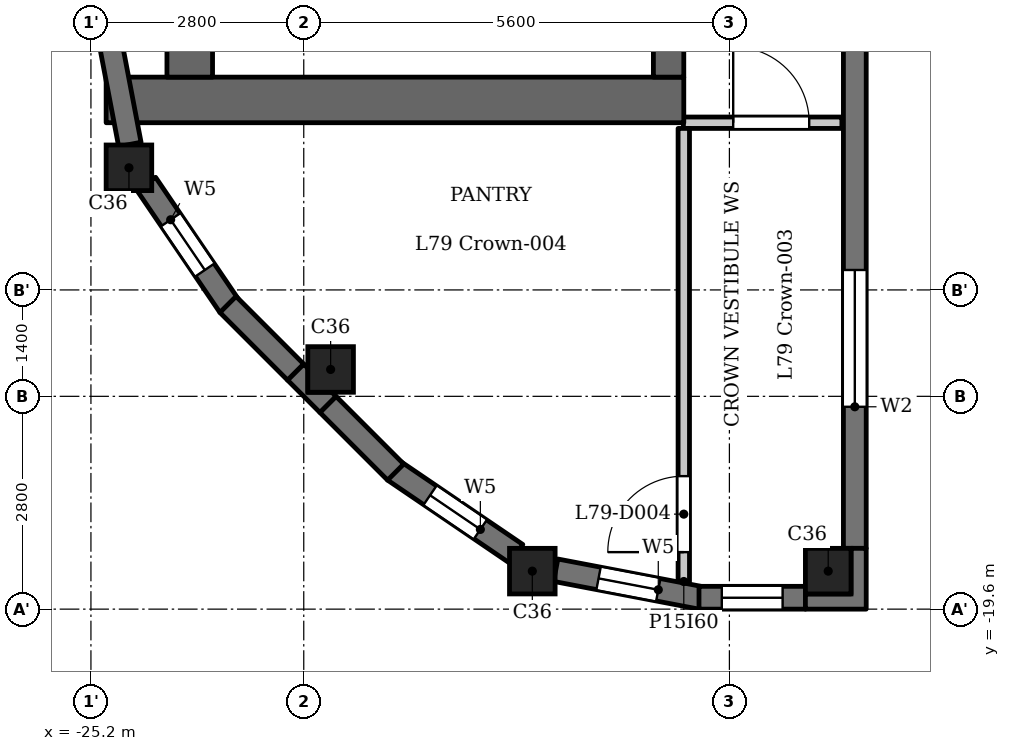
"""IFC4 building model, lengths in metres.
Left out: names, types, materials, properties, quantities, classifications, styles, units other than length and angle.
Written with IfcOpenShell. Run it as: python <this file> out.ifc"""

import sys

from ifc_helpers import new_model, si_unit, direction, frame, frame_2d, origin, origin_2d, place, context, subcontext, project, spatial, polyline, rectangle, outline, extrude, element, fill, save


model = new_model("IFC4")
c1 = context("Model", 3, precision=1e-05, world=origin(), true_north=direction((0.0, 1.0)))
c2 = subcontext(c1, "Body", "Model", "MODEL_VIEW")
j1 = project(units=[si_unit("LENGTHUNIT", "METRE"), si_unit("PLANEANGLEUNIT", "RADIAN")], contexts=[c1])
p1 = place(None, origin())
s1 = spatial("IfcSite", under=j1, at=p1, CompositionType="ELEMENT")
p2 = place(p1, origin())
s2 = spatial("IfcBuilding", under=s1, at=p2, CompositionType="ELEMENT")
p3 = place(p2, frame((0.0, 0.0, 306.9)))
s3 = spatial("IfcBuildingStorey", under=s2, at=p3, CompositionType="ELEMENT", Elevation=306.9)
for number, where, z_axis, x_axis in (
    (1, (-24.7, -13.793, 0.0), (0.0, 0.0, 1.0), (1.0, 0.0, 0.0)),
    (2, (-22.046, -16.446, 0.0), (0.0, 0.0, 1.0), (1.0, 0.0, 0.0)),
    (3, (-19.393, -19.1, 0.0), (0.0, 0.0, 1.0), (1.0, 0.0, 0.0)),
    (4, (-15.5, -19.1, 0.0), (0.0, 0.0, 1.0), (1.0, 0.0, 0.0)),
):
    element("IfcColumn", number, at=place(p3, frame(where, z_axis=z_axis, x_axis=x_axis)), inside=s3, PredefinedType="COLUMN", context=c2, shape_type="SweptSolid", body=[
        extrude(rectangle(XDim=0.6, YDim=0.6, at=origin_2d()), origin(), (0.0, 0.0, 1.0), 3.5),
    ])
p4 = place(p3, frame((-21.213, -17.779, 0.0), z_axis=(0.0, 0.0, 1.0), x_axis=(0.827022075481, -0.562169446579, 0.0)))
e5 = element("IfcWall", 5, at=p4, inside=s3, PredefinedType="SOLIDWALL", context=c2, shape_type="SweptSolid", body=[
    extrude(rectangle(XDim=1.948, YDim=0.3, at=frame_2d((0.974, 0.0))), origin(), (0.0, 0.0, 1.0), 2.6),
])
p5 = place(p4, frame((0.574, 0.0, 0.6)))
e6 = element("IfcOpeningElement", 6, at=p5, cuts=e5, PredefinedType="OPENING", context=c2, shape_type="SweptSolid", body=[
    extrude(rectangle(XDim=0.8, YDim=1.55, at=frame_2d((0.4, 0.775))), frame((0.0, 0.16, 0.0), z_axis=(0.0, -1.0, 0.0), x_axis=(1.0, 0.0, 0.0)), (0.0, 0.0, 1.0), 0.32),
])
p6 = place(p3, frame((-19.085, -19.088, 0.0), z_axis=(0.0, 0.0, 1.0), x_axis=(0.982286967073, -0.187382801553, 0.0)))
e7 = element("IfcWall", 7, at=p6, inside=s3, PredefinedType="SOLIDWALL", context=c2, shape_type="SweptSolid", body=[
    extrude(rectangle(XDim=1.948, YDim=0.3, at=frame_2d((0.974, 0.0))), origin(), (0.0, 0.0, 1.0), 2.6),
])
p7 = place(p6, frame((0.574, 0.0, 0.6)))
e8 = element("IfcOpeningElement", 8, at=p7, cuts=e7, PredefinedType="OPENING", context=c2, shape_type="SweptSolid", body=[
    extrude(rectangle(XDim=0.8, YDim=1.55, at=frame_2d((0.4, 0.775))), frame((0.0, 0.16, 0.0), z_axis=(0.0, -1.0, 0.0), x_axis=(1.0, 0.0, 0.0)), (0.0, 0.0, 1.0), 0.32),
])
p8 = place(p3, frame((-17.2, -19.45, 0.0), z_axis=(0.0, 0.0, 1.0), x_axis=(1.0, 0.0, 0.0)))
e9 = element("IfcWall", 9, at=p8, inside=s3, PredefinedType="SOLIDWALL", context=c2, shape_type="SweptSolid", body=[
    extrude(rectangle(XDim=1.4, YDim=0.3, at=frame_2d((0.7, 0.0))), origin(), (0.0, 0.0, 1.0), 3.2),
])
p9 = place(p8, frame((0.3, 0.0, 0.6)))
e10 = element("IfcOpeningElement", 10, at=p9, cuts=e9, PredefinedType="OPENING", context=c2, shape_type="SweptSolid", body=[
    extrude(rectangle(XDim=0.8, YDim=1.55, at=frame_2d((0.4, 0.775))), frame((0.0, 0.16, 0.0), z_axis=(0.0, -1.0, 0.0), x_axis=(1.0, 0.0, 0.0)), (0.0, 0.0, 1.0), 0.32),
])
p10 = place(p3, frame((-15.15, -18.8, 0.0), z_axis=(0.0, 0.0, 1.0), x_axis=(0.0, 1.0, 0.0)))
e11 = element("IfcWall", 11, at=p10, inside=s3, PredefinedType="SOLIDWALL", context=c2, shape_type="SweptSolid", body=[
    extrude(rectangle(XDim=7.3, YDim=0.3, at=frame_2d((3.65, 0.0))), origin(), (0.0, 0.0, 1.0), 3.2),
])
p11 = place(p10, frame((1.863, 0.0, 0.9)))
e12 = element("IfcOpeningElement", 12, at=p11, cuts=e11, PredefinedType="OPENING", context=c2, shape_type="SweptSolid", body=[
    extrude(rectangle(XDim=1.8, YDim=1.25, at=frame_2d((0.9, 0.625))), frame((0.0, 0.16, 0.0), z_axis=(0.0, -1.0, 0.0), x_axis=(1.0, 0.0, 0.0)), (0.0, 0.0, 1.0), 0.32),
])
p12 = place(p3, frame((-25.052, -11.573, 0.0), z_axis=(0.0, 0.0, 1.0), x_axis=(0.187354129902, -0.982292436095, 0.0)))
e13 = element("IfcWall", 13, at=p12, inside=s3, PredefinedType="SOLIDWALL", context=c2, shape_type="SweptSolid", body=[
    extrude(rectangle(XDim=1.947, YDim=0.3, at=frame_2d((0.973, 0.0))), origin(), (0.0, 0.0, 1.0), 2.6),
])
p13 = place(p3, frame((-24.474, -14.002, 0.0), z_axis=(0.0, 0.0, 1.0), x_axis=(0.562025435703, -0.827119948752, 0.0)))
e14 = element("IfcWall", 14, at=p13, inside=s3, PredefinedType="SOLIDWALL", context=c2, shape_type="SweptSolid", body=[
    extrude(rectangle(XDim=1.948, YDim=0.3, at=frame_2d((0.974, 0.0))), origin(), (0.0, 0.0, 1.0), 2.6),
])
p14 = place(p13, frame((0.574, 0.0, 0.6)))
e15 = element("IfcOpeningElement", 15, at=p14, cuts=e14, PredefinedType="OPENING", context=c2, shape_type="SweptSolid", body=[
    extrude(rectangle(XDim=0.8, YDim=1.55, at=frame_2d((0.4, 0.775))), frame((0.0, 0.16, 0.0), z_axis=(0.0, -1.0, 0.0), x_axis=(1.0, 0.0, 0.0)), (0.0, 0.0, 1.0), 0.32),
])
for number, where, z_axis, x_axis in (
    (16, (-23.397, -15.591, 0.0), (0.0, 0.0, 1.0), (0.707, -0.707, 0.0)),
    (17, (-22.082, -16.906, 0.0), (0.0, 0.0, 1.0), (0.707, -0.707, 0.0)),
):
    element("IfcWall", number, at=place(p3, frame(where, z_axis=z_axis, x_axis=x_axis)), inside=s3, PredefinedType="SOLIDWALL", context=c2, shape_type="SweptSolid", body=[
        extrude(rectangle(XDim=1.26, YDim=0.3, at=frame_2d((0.63, 0.0))), origin(), (0.0, 0.0, 1.0), 3.2),
    ])
p15 = place(p3, frame((-17.4, -12.9, 0.0), z_axis=(0.0, 0.0, 1.0), x_axis=(-1.0, 0.0, 0.0)))
e18 = element("IfcWall", 18, at=p15, inside=s3, PredefinedType="SHEAR", context=c2, shape_type="SweptSolid", body=[
    extrude(rectangle(XDim=7.6, YDim=0.6, at=frame_2d((3.8, 0.0))), origin(), (0.0, 0.0, 1.0), 3.2),
])
p16 = place(p3, frame((-17.6, -12.6, 0.0), z_axis=(0.0, 0.0, 1.0), x_axis=(0.0, 1.0, 0.0)))
e19 = element("IfcWall", 19, at=p16, inside=s3, PredefinedType="SHEAR", context=c2, shape_type="SweptSolid", body=[
    extrude(rectangle(XDim=25.2, YDim=0.4, at=frame_2d((12.6, 0.0))), origin(), (0.0, 0.0, 1.0), 3.2),
])
p17 = place(p16, frame((8.8, 0.0, 0.0)))
e20 = element("IfcOpeningElement", 20, at=p17, cuts=e19, PredefinedType="OPENING", context=c2, shape_type="SweptSolid", body=[
    extrude(rectangle(XDim=0.9, YDim=2.1, at=frame_2d((0.45, 1.05))), frame((0.0, 0.21, 0.0), z_axis=(0.0, -1.0, 0.0), x_axis=(1.0, 0.0, 0.0)), (0.0, 0.0, 1.0), 0.42),
])
p18 = place(p16, frame((17.05, 0.0, 0.0)))
e21 = element("IfcOpeningElement", 21, at=p18, cuts=e19, PredefinedType="OPENING", context=c2, shape_type="SweptSolid", body=[
    extrude(rectangle(XDim=0.9, YDim=2.1, at=frame_2d((0.45, 1.05))), frame((0.0, 0.21, 0.0), z_axis=(0.0, -1.0, 0.0), x_axis=(1.0, 0.0, 0.0)), (0.0, 0.0, 1.0), 0.42),
])
p19 = place(p16, frame((23.25, 0.0, 0.0)))
e22 = element("IfcOpeningElement", 22, at=p19, cuts=e19, PredefinedType="OPENING", context=c2, shape_type="SweptSolid", body=[
    extrude(rectangle(XDim=1.1, YDim=2.1, at=frame_2d((0.55, 1.05))), frame((0.0, 0.21, 0.0), z_axis=(0.0, -1.0, 0.0), x_axis=(1.0, 0.0, 0.0)), (0.0, 0.0, 1.0), 0.42),
])
p20 = place(p16, frame((0.85, 0.0, 0.0)))
e23 = element("IfcOpeningElement", 23, at=p20, cuts=e19, PredefinedType="OPENING", context=c2, shape_type="SweptSolid", body=[
    extrude(rectangle(XDim=1.1, YDim=2.1, at=frame_2d((0.55, 1.05))), frame((0.0, 0.21, 0.0), z_axis=(0.0, -1.0, 0.0), x_axis=(1.0, 0.0, 0.0)), (0.0, 0.0, 1.0), 0.42),
])
p21 = place(p16, frame((13.075, 0.0, 0.0)))
e24 = element("IfcOpeningElement", 24, at=p21, cuts=e19, PredefinedType="OPENING", context=c2, shape_type="SweptSolid", body=[
    extrude(rectangle(XDim=1.8, YDim=2.1, at=frame_2d((0.9, 1.05))), frame((0.0, 0.21, 0.0), z_axis=(0.0, -1.0, 0.0), x_axis=(1.0, 0.0, 0.0)), (0.0, 0.0, 1.0), 0.42),
])
p22 = place(p3, frame((-23.9, -12.6, 0.0), z_axis=(0.0, 0.0, 1.0), x_axis=(0.0, 1.0, 0.0)))
e25 = element("IfcWall", 25, at=p22, inside=s3, PredefinedType="SHEAR", context=c2, shape_type="SweptSolid", body=[
    extrude(rectangle(XDim=25.2, YDim=0.6, at=frame_2d((12.6, 0.0))), origin(), (0.0, 0.0, 1.0), 3.2),
])
p23 = place(p3, frame((-17.405, -13.2, 0.0), z_axis=(0.0, 0.0, 1.0), x_axis=(1.0, 0.0, 0.0)))
e26 = element("IfcWall", 26, at=p23, inside=s3, PredefinedType="PARTITIONING", context=c2, shape_type="SweptSolid", body=[
    extrude(rectangle(XDim=2.085, YDim=0.15, at=frame_2d((1.042, 0.0))), origin(), (0.0, 0.0, 1.0), 3.2),
])
p24 = place(p23, frame((0.655, 0.0, 0.0)))
e27 = element("IfcOpeningElement", 27, at=p24, cuts=e26, PredefinedType="OPENING", context=c2, shape_type="SweptSolid", body=[
    extrude(rectangle(XDim=1.0, YDim=2.1, at=frame_2d((0.5, 1.05))), frame((0.0, 0.085, 0.0), z_axis=(0.0, -1.0, 0.0), x_axis=(1.0, 0.0, 0.0)), (0.0, 0.0, 1.0), 0.17),
])
p25 = place(p3, frame((-17.4, -19.236, 0.0), z_axis=(0.0, 0.0, 1.0), x_axis=(0.0, 1.0, 0.0)))
e28 = element("IfcWall", 28, at=p25, inside=s3, PredefinedType="PARTITIONING", context=c2, shape_type="SweptSolid", body=[
    extrude(rectangle(XDim=5.961, YDim=0.15, at=frame_2d((2.981, 0.0))), origin(), (0.0, 0.0, 1.0), 3.2),
])
p26 = place(p25, frame((0.386, 0.0, 0.0)))
e29 = element("IfcOpeningElement", 29, at=p26, cuts=e28, PredefinedType="OPENING", context=c2, shape_type="SweptSolid", body=[
    extrude(rectangle(XDim=1.0, YDim=2.1, at=frame_2d((0.5, 1.05))), frame((0.0, 0.085, 0.0), z_axis=(0.0, -1.0, 0.0), x_axis=(1.0, 0.0, 0.0)), (0.0, 0.0, 1.0), 0.17),
])
p27 = place(p3, origin())
e30 = element("IfcWall", 30, at=p27, inside=s3, PredefinedType="SOLIDWALL", context=c2, shape_type="SweptSolid", body=[
    extrude(outline(polyline([(-15.8, -19.6), (-15.0, -19.6), (-15.0, -18.8), (-15.2, -18.8), (-15.2, -19.4), (-15.8, -19.4), (-15.8, -19.6)])), origin(), (0.0, 0.0, 1.0), 3.2),
])
e31 = element("IfcWall", 31, at=p27, inside=s3, PredefinedType="SOLIDWALL", context=c2, shape_type="SweptSolid", body=[
    extrude(outline(polyline([(-22.4, -16.376), (-22.612, -16.588), (-22.188, -17.012), (-21.976, -16.8), (-22.029, -16.746), (-22.346, -16.746), (-22.346, -16.429), (-22.4, -16.376)])), origin(), (0.0, 0.0, 1.0), 3.2),
])
p28 = place(p24, origin())
e32 = element("IfcDoor", 32, at=p28, inside=s3, OperationType="SINGLE_SWING_RIGHT", PredefinedType="DOOR", context=c2, shape_type="SweptSolid", body=[
    extrude(rectangle(XDim=1.0, YDim=2.1, at=frame_2d((0.5, 1.05))), frame((0.0, 0.025, 0.0), z_axis=(0.0, -1.0, 0.0), x_axis=(1.0, 0.0, 0.0)), (0.0, 0.0, 1.0), 0.05),
])
fill(e27, e32)
p29 = place(p26, origin())
e33 = element("IfcDoor", 33, at=p29, inside=s3, OperationType="SINGLE_SWING_RIGHT", PredefinedType="DOOR", context=c2, shape_type="SweptSolid", body=[
    extrude(rectangle(XDim=1.0, YDim=2.1, at=frame_2d((0.5, 1.05))), frame((0.0, 0.025, 0.0), z_axis=(0.0, -1.0, 0.0), x_axis=(1.0, 0.0, 0.0)), (0.0, 0.0, 1.0), 0.05),
])
fill(e29, e33)
p30 = place(p5, origin())
e34 = element("IfcWindow", 34, at=p30, inside=s3, PartitioningType="SINGLE_PANEL", PredefinedType="WINDOW", context=c2, shape_type="SweptSolid", body=[
    extrude(rectangle(XDim=0.8, YDim=1.55, at=frame_2d((0.4, 0.775))), frame((0.0, 0.03, 0.0), z_axis=(0.0, -1.0, 0.0), x_axis=(1.0, 0.0, 0.0)), (0.0, 0.0, 1.0), 0.06),
])
fill(e6, e34)
p31 = place(p7, origin())
e35 = element("IfcWindow", 35, at=p31, inside=s3, PartitioningType="SINGLE_PANEL", PredefinedType="WINDOW", context=c2, shape_type="SweptSolid", body=[
    extrude(rectangle(XDim=0.8, YDim=1.55, at=frame_2d((0.4, 0.775))), frame((0.0, 0.03, 0.0), z_axis=(0.0, -1.0, 0.0), x_axis=(1.0, 0.0, 0.0)), (0.0, 0.0, 1.0), 0.06),
])
fill(e8, e35)
p32 = place(p9, origin())
e36 = element("IfcWindow", 36, at=p32, inside=s3, PartitioningType="SINGLE_PANEL", PredefinedType="WINDOW", context=c2, shape_type="SweptSolid", body=[
    extrude(rectangle(XDim=0.8, YDim=1.55, at=frame_2d((0.4, 0.775))), frame((0.0, 0.03, 0.0), z_axis=(0.0, -1.0, 0.0), x_axis=(1.0, 0.0, 0.0)), (0.0, 0.0, 1.0), 0.06),
])
fill(e10, e36)
p33 = place(p11, origin())
e37 = element("IfcWindow", 37, at=p33, inside=s3, PartitioningType="SINGLE_PANEL", PredefinedType="WINDOW", context=c2, shape_type="SweptSolid", body=[
    extrude(rectangle(XDim=1.8, YDim=1.25, at=frame_2d((0.9, 0.625))), frame((0.0, 0.03, 0.0), z_axis=(0.0, -1.0, 0.0), x_axis=(1.0, 0.0, 0.0)), (0.0, 0.0, 1.0), 0.06),
])
fill(e12, e37)
p34 = place(p14, origin())
e38 = element("IfcWindow", 38, at=p34, inside=s3, PartitioningType="SINGLE_PANEL", PredefinedType="WINDOW", context=c2, shape_type="SweptSolid", body=[
    extrude(rectangle(XDim=0.8, YDim=1.55, at=frame_2d((0.4, 0.775))), frame((0.0, 0.03, 0.0), z_axis=(0.0, -1.0, 0.0), x_axis=(1.0, 0.0, 0.0)), (0.0, 0.0, 1.0), 0.06),
])
fill(e15, e38)
save(model, sys.argv[1])
